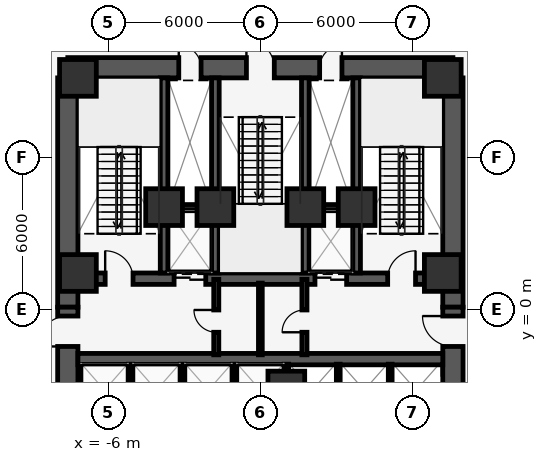
"""IFC4 building model, lengths in metres.
Left out: names, types, materials, properties, quantities, classifications, styles, units other than length and angle.
Written with IfcOpenShell. Run it as: python <this file> out.ifc"""

import sys

from ifc_helpers import new_model, si_unit, direction, frame, frame_2d, origin, origin_2d, place, context, subcontext, project, spatial, rectangle, extrude, element, fill, save


model = new_model("IFC4")
c1 = context("Model", 3, precision=1e-05, world=origin(), true_north=direction((0.0, 1.0)))
c2 = subcontext(c1, "Body", "Model", "MODEL_VIEW")
j1 = project(units=[si_unit("LENGTHUNIT", "METRE"), si_unit("PLANEANGLEUNIT", "RADIAN")], contexts=[c1])
p1 = place(None, origin())
s1 = spatial("IfcSite", under=j1, at=p1, CompositionType="ELEMENT")
p2 = place(p1, origin())
s2 = spatial("IfcBuilding", under=s1, at=p2, CompositionType="ELEMENT")
p3 = place(p2, frame((0.0, 0.0, 62.4)))
s3 = spatial("IfcBuildingStorey", under=s2, at=p3, CompositionType="ELEMENT", Elevation=62.4)
p4 = place(p3, frame((-7.6, 9.55, 0.0), z_axis=(0.0, 0.0, 1.0), x_axis=(1.0, 0.0, 0.0)))
e1 = element("IfcWall", 1, at=p4, inside=s3, PredefinedType="SHEAR", context=c2, shape_type="SweptSolid", body=[
    extrude(rectangle(XDim=15.2, YDim=0.8, at=frame_2d((7.6, 0.0))), origin(), (0.0, 0.0, 1.0), 4.35),
])
p5 = place(p4, frame((7.05, 0.0, 0.0)))
e2 = element("IfcOpeningElement", 2, at=p5, cuts=e1, PredefinedType="OPENING", context=c2, shape_type="SweptSolid", body=[
    extrude(rectangle(XDim=1.1, YDim=2.15, at=frame_2d((0.55, 1.075))), frame((0.0, 0.41, 0.0), z_axis=(0.0, -1.0, 0.0), x_axis=(1.0, 0.0, 0.0)), (0.0, 0.0, 1.0), 0.82),
])
p6 = place(p4, frame((4.38, 0.0, 0.0)))
e3 = element("IfcOpeningElement", 3, at=p6, cuts=e1, PredefinedType="OPENING", context=c2, shape_type="SweptSolid", body=[
    extrude(rectangle(XDim=0.88, YDim=2.15, at=frame_2d((0.44, 1.075))), frame((0.0, 0.41, 0.0), z_axis=(0.0, -1.0, 0.0), x_axis=(1.0, 0.0, 0.0)), (0.0, 0.0, 1.0), 0.82),
])
p7 = place(p4, frame((9.94, 0.0, 0.0)))
e4 = element("IfcOpeningElement", 4, at=p7, cuts=e1, PredefinedType="OPENING", context=c2, shape_type="SweptSolid", body=[
    extrude(rectangle(XDim=0.88, YDim=2.15, at=frame_2d((0.44, 1.075))), frame((0.0, 0.41, 0.0), z_axis=(0.0, -1.0, 0.0), x_axis=(1.0, 0.0, 0.0)), (0.0, 0.0, 1.0), 0.82),
])
p8 = place(p3, frame((-7.2, 1.225, 0.0), z_axis=(0.0, 0.0, 1.0), x_axis=(1.0, 0.0, 0.0)))
e5 = element("IfcWall", 5, at=p8, inside=s3, PredefinedType="SHEAR", context=c2, shape_type="SweptSolid", body=[
    extrude(rectangle(XDim=14.4, YDim=0.45, at=frame_2d((7.2, 0.0))), origin(), (0.0, 0.0, 1.0), 4.35),
])
p9 = place(p8, frame((3.795, 0.0, 0.0)))
e6 = element("IfcOpeningElement", 6, at=p9, cuts=e5, PredefinedType="OPENING", context=c2, shape_type="SweptSolid", body=[
    extrude(rectangle(XDim=1.25, YDim=2.25, at=frame_2d((0.625, 1.125))), frame((0.0, 0.235, 0.0), z_axis=(0.0, -1.0, 0.0), x_axis=(1.0, 0.0, 0.0)), (0.0, 0.0, 1.0), 0.47),
])
p10 = place(p8, frame((9.355, 0.0, 0.0)))
e7 = element("IfcOpeningElement", 7, at=p10, cuts=e5, PredefinedType="OPENING", context=c2, shape_type="SweptSolid", body=[
    extrude(rectangle(XDim=1.25, YDim=2.25, at=frame_2d((0.625, 1.125))), frame((0.0, 0.235, 0.0), z_axis=(0.0, -1.0, 0.0), x_axis=(1.0, 0.0, 0.0)), (0.0, 0.0, 1.0), 0.47),
])
p11 = place(p8, frame((1.075, 0.0, 0.0)))
e8 = element("IfcOpeningElement", 8, at=p11, cuts=e5, PredefinedType="OPENING", context=c2, shape_type="SweptSolid", body=[
    extrude(rectangle(XDim=1.1, YDim=2.15, at=frame_2d((0.55, 1.075))), frame((0.0, 0.235, 0.0), z_axis=(0.0, -1.0, 0.0), x_axis=(1.0, 0.0, 0.0)), (0.0, 0.0, 1.0), 0.47),
])
p12 = place(p8, frame((12.225, 0.0, 0.0)))
e9 = element("IfcOpeningElement", 9, at=p12, cuts=e5, PredefinedType="OPENING", context=c2, shape_type="SweptSolid", body=[
    extrude(rectangle(XDim=1.1, YDim=2.15, at=frame_2d((0.55, 1.075))), frame((0.0, 0.235, 0.0), z_axis=(0.0, -1.0, 0.0), x_axis=(1.0, 0.0, 0.0)), (0.0, 0.0, 1.0), 0.47),
])
for number, where, z_axis, x_axis in (
    (10, (-3.8, 1.45, 0.0), (0.0, 0.0, 1.0), (0.0, 1.0, 0.0)),
    (11, (-1.775, 1.45, 0.0), (0.0, 0.0, 1.0), (0.0, 1.0, 0.0)),
    (12, (1.775, 1.45, 0.0), (0.0, 0.0, 1.0), (0.0, 1.0, 0.0)),
    (13, (3.8, 1.45, 0.0), (0.0, 0.0, 1.0), (0.0, 1.0, 0.0)),
):
    element("IfcWall", number, at=place(p3, frame(where, z_axis=z_axis, x_axis=x_axis)), inside=s3, PredefinedType="SHEAR", context=c2, shape_type="SweptSolid", body=[
        extrude(rectangle(XDim=7.7, YDim=0.3, at=frame_2d((3.85, 0.0))), origin(), (0.0, 0.0, 1.0), 4.35),
    ])
for number, where, z_axis, x_axis in (
    (14, (-7.6, 0.1, 0.0), (0.0, 0.0, 1.0), (0.0, 1.0, 0.0)),
    (15, (7.6, 0.1, 0.0), (0.0, 0.0, 1.0), (0.0, 1.0, 0.0)),
):
    element("IfcWall", number, at=place(p3, frame(where, z_axis=z_axis, x_axis=x_axis)), inside=s3, PredefinedType="SHEAR", context=c2, shape_type="SweptSolid", body=[
        extrude(rectangle(XDim=9.05, YDim=0.8, at=frame_2d((4.525, 0.0))), origin(), (0.0, 0.0, 1.0), 4.35),
    ])
p13 = place(p3, frame((-7.6, -8.85, 0.0), z_axis=(0.0, 0.0, 1.0), x_axis=(0.0, 1.0, 0.0)))
e16 = element("IfcWall", 16, at=p13, inside=s3, PredefinedType="SHEAR", context=c2, shape_type="SweptSolid", body=[
    extrude(rectangle(XDim=8.95, YDim=0.8, at=frame_2d((4.475, 0.0))), origin(), (0.0, 0.0, 1.0), 4.35),
])
p14 = place(p13, frame((2.49, 0.0, 0.0)))
e17 = element("IfcOpeningElement", 17, at=p14, cuts=e16, PredefinedType="OPENING", context=c2, shape_type="SweptSolid", body=[
    extrude(rectangle(XDim=1.8, YDim=2.2, at=frame_2d((0.9, 1.1))), frame((0.0, 0.41, 0.0), z_axis=(0.0, -1.0, 0.0), x_axis=(1.0, 0.0, 0.0)), (0.0, 0.0, 1.0), 0.82),
])
p15 = place(p13, frame((7.4, 0.0, 0.0)))
e18 = element("IfcOpeningElement", 18, at=p15, cuts=e16, PredefinedType="OPENING", context=c2, shape_type="SweptSolid", body=[
    extrude(rectangle(XDim=1.2, YDim=2.15, at=frame_2d((0.6, 1.075))), frame((0.0, 0.41, 0.0), z_axis=(0.0, -1.0, 0.0), x_axis=(1.0, 0.0, 0.0)), (0.0, 0.0, 1.0), 0.82),
])
p16 = place(p3, frame((7.6, -8.85, 0.0), z_axis=(0.0, 0.0, 1.0), x_axis=(0.0, 1.0, 0.0)))
e19 = element("IfcWall", 19, at=p16, inside=s3, PredefinedType="SHEAR", context=c2, shape_type="SweptSolid", body=[
    extrude(rectangle(XDim=8.95, YDim=0.8, at=frame_2d((4.475, 0.0))), origin(), (0.0, 0.0, 1.0), 4.35),
])
p17 = place(p16, frame((2.49, 0.0, 0.0)))
e20 = element("IfcOpeningElement", 20, at=p17, cuts=e19, PredefinedType="OPENING", context=c2, shape_type="SweptSolid", body=[
    extrude(rectangle(XDim=1.8, YDim=2.2, at=frame_2d((0.9, 1.1))), frame((0.0, 0.41, 0.0), z_axis=(0.0, -1.0, 0.0), x_axis=(1.0, 0.0, 0.0)), (0.0, 0.0, 1.0), 0.82),
])
p18 = place(p16, frame((7.4, 0.0, 0.0)))
e21 = element("IfcOpeningElement", 21, at=p18, cuts=e19, PredefinedType="OPENING", context=c2, shape_type="SweptSolid", body=[
    extrude(rectangle(XDim=1.2, YDim=2.15, at=frame_2d((0.6, 1.075))), frame((0.0, 0.41, 0.0), z_axis=(0.0, -1.0, 0.0), x_axis=(1.0, 0.0, 0.0)), (0.0, 0.0, 1.0), 0.82),
])
p19 = place(p3, frame((-7.2, -1.95, 0.0), z_axis=(0.0, 0.0, 1.0), x_axis=(1.0, 0.0, 0.0)))
e22 = element("IfcWall", 22, at=p19, inside=s3, PredefinedType="SHEAR", context=c2, shape_type="SweptSolid", body=[
    extrude(rectangle(XDim=14.4, YDim=0.45, at=frame_2d((7.2, 0.0))), origin(), (0.0, 0.0, 1.0), 4.35),
])
for number, where, z_axis, x_axis in (
    (23, (7.2, 1.45, 0.0), (0.0, 0.0, 1.0), (1.0, 0.0, 0.0)),
    (24, (7.2, 9.15, 0.0), (0.0, 0.0, 1.0), (1.0, 0.0, 0.0)),
    (25, (-7.2, 9.15, 0.0), (0.0, 0.0, 1.0), (1.0, 0.0, 0.0)),
    (26, (-7.2, 1.45, 0.0), (0.0, 0.0, 1.0), (1.0, 0.0, 0.0)),
    (27, (-3.8, 4.05, 0.0), (0.0, 0.0, 1.0), (1.0, 0.0, 0.0)),
    (28, (3.8, 4.05, 0.0), (0.0, 0.0, 1.0), (1.0, 0.0, 0.0)),
    (29, (-1.775, 4.05, 0.0), (0.0, 0.0, 1.0), (1.0, 0.0, 0.0)),
    (30, (1.775, 4.05, 0.0), (0.0, 0.0, 1.0), (1.0, 0.0, 0.0)),
    (31, (1.025, -3.15, 0.0), (0.0, 0.0, 1.0), (1.0, 0.0, 0.0)),
):
    element("IfcColumn", number, at=place(p3, frame(where, z_axis=z_axis, x_axis=x_axis)), inside=s3, PredefinedType="COLUMN", context=c2, shape_type="SweptSolid", body=[
        extrude(rectangle(XDim=1.45, YDim=1.45, at=origin_2d()), origin(), (0.0, 0.0, 1.0), 4.6),
    ])
p20 = place(p3, frame((-0.115, 39.555, 0.0), z_axis=(0.0, 0.0, 1.0), x_axis=(0.605877389385, -0.795558036243, 0.0)))
e32 = element("IfcWall", 32, at=p20, inside=s3, PredefinedType="STANDARD", context=c2, shape_type="SweptSolid", body=[
    extrude(rectangle(XDim=64.058, YDim=0.32, at=frame_2d((32.029, 0.0))), origin(), (0.0, 0.0, 1.0), 4.35),
])
p21 = place(p20, frame((6.179, 0.0, 0.85)))
e33 = element("IfcOpeningElement", 33, at=p21, cuts=e32, PredefinedType="OPENING", context=c2, shape_type="SweptSolid", body=[
    extrude(rectangle(XDim=1.3, YDim=2.1, at=frame_2d((0.65, 1.05))), frame((0.0, 0.17, 0.0), z_axis=(0.0, -1.0, 0.0), x_axis=(1.0, 0.0, 0.0)), (0.0, 0.0, 1.0), 0.34),
])
p22 = place(p20, frame((11.779, 0.0, 0.85)))
e34 = element("IfcOpeningElement", 34, at=p22, cuts=e32, PredefinedType="OPENING", context=c2, shape_type="SweptSolid", body=[
    extrude(rectangle(XDim=1.3, YDim=2.1, at=frame_2d((0.65, 1.05))), frame((0.0, 0.17, 0.0), z_axis=(0.0, -1.0, 0.0), x_axis=(1.0, 0.0, 0.0)), (0.0, 0.0, 1.0), 0.34),
])
p23 = place(p20, frame((17.379, 0.0, 0.85)))
e35 = element("IfcOpeningElement", 35, at=p23, cuts=e32, PredefinedType="OPENING", context=c2, shape_type="SweptSolid", body=[
    extrude(rectangle(XDim=1.3, YDim=2.1, at=frame_2d((0.65, 1.05))), frame((0.0, 0.17, 0.0), z_axis=(0.0, -1.0, 0.0), x_axis=(1.0, 0.0, 0.0)), (0.0, 0.0, 1.0), 0.34),
])
p24 = place(p20, frame((50.979, 0.0, 0.85)))
e36 = element("IfcOpeningElement", 36, at=p24, cuts=e32, PredefinedType="OPENING", context=c2, shape_type="SweptSolid", body=[
    extrude(rectangle(XDim=1.3, YDim=2.1, at=frame_2d((0.65, 1.05))), frame((0.0, 0.17, 0.0), z_axis=(0.0, -1.0, 0.0), x_axis=(1.0, 0.0, 0.0)), (0.0, 0.0, 1.0), 0.34),
])
p25 = place(p20, frame((56.579, 0.0, 0.85)))
e37 = element("IfcOpeningElement", 37, at=p25, cuts=e32, PredefinedType="OPENING", context=c2, shape_type="SweptSolid", body=[
    extrude(rectangle(XDim=1.3, YDim=2.1, at=frame_2d((0.65, 1.05))), frame((0.0, 0.17, 0.0), z_axis=(0.0, -1.0, 0.0), x_axis=(1.0, 0.0, 0.0)), (0.0, 0.0, 1.0), 0.34),
])
for number, where, z_axis, x_axis in (
    (38, (-3.65, 4.05, 0.0), (0.0, 0.0, 1.0), (1.0, 0.0, 0.0)),
    (39, (1.92, 4.05, 0.0), (0.0, 0.0, 1.0), (1.0, 0.0, 0.0)),
):
    element("IfcWall", number, at=place(p3, frame(where, z_axis=z_axis, x_axis=x_axis)), inside=s3, PredefinedType="PARTITIONING", context=c2, shape_type="SweptSolid", body=[
        extrude(rectangle(XDim=1.73, YDim=0.2, at=frame_2d((0.865, 0.0))), origin(), (0.0, 0.0, 1.0), 4.35),
    ])
for number, where, z_axis, x_axis in (
    (40, (-5.125, -4.18, 0.0), (0.0, 0.0, 1.0), (0.0, 1.0, 0.0)),
    (41, (-3.075, -4.18, 0.0), (0.0, 0.0, 1.0), (0.0, 1.0, 0.0)),
    (42, (-1.025, -4.18, 0.0), (0.0, 0.0, 1.0), (0.0, 1.0, 0.0)),
):
    element("IfcWall", number, at=place(p3, frame(where, z_axis=z_axis, x_axis=x_axis)), inside=s3, PredefinedType="PARTITIONING", context=c2, shape_type="SweptSolid", body=[
        extrude(rectangle(XDim=2.03, YDim=0.15, at=frame_2d((1.015, 0.0))), origin(), (0.0, 0.0, 1.0), 4.35),
    ])
p26 = place(p3, frame((1.025, -4.18, 0.0), z_axis=(0.0, 0.0, 1.0), x_axis=(0.0, 1.0, 0.0)))
e43 = element("IfcWall", 43, at=p26, inside=s3, PredefinedType="PARTITIONING", context=c2, shape_type="SweptSolid", body=[
    extrude(rectangle(XDim=2.03, YDim=0.18, at=frame_2d((1.015, 0.0))), origin(), (0.0, 0.0, 1.0), 3.398),
])
for number, where, z_axis, x_axis in (
    (44, (3.075, -4.18, 0.0), (0.0, 0.0, 1.0), (0.0, 1.0, 0.0)),
    (45, (5.125, -4.18, 0.0), (0.0, 0.0, 1.0), (0.0, 1.0, 0.0)),
):
    element("IfcWall", number, at=place(p3, frame(where, z_axis=z_axis, x_axis=x_axis)), inside=s3, PredefinedType="PARTITIONING", context=c2, shape_type="SweptSolid", body=[
        extrude(rectangle(XDim=2.03, YDim=0.15, at=frame_2d((1.015, 0.0))), origin(), (0.0, 0.0, 1.0), 4.35),
    ])
p27 = place(p3, frame((-1.74, -1.78, 0.0), z_axis=(0.0, 0.0, 1.0), x_axis=(0.0, 1.0, 0.0)))
e46 = element("IfcWall", 46, at=p27, inside=s3, PredefinedType="PARTITIONING", context=c2, shape_type="SweptSolid", body=[
    extrude(rectangle(XDim=2.98, YDim=0.2, at=frame_2d((1.49, 0.0))), origin(), (0.0, 0.0, 1.0), 4.35),
])
p28 = place(p27, frame((0.89, 0.0, 0.0)))
e47 = element("IfcOpeningElement", 47, at=p28, cuts=e46, PredefinedType="OPENING", context=c2, shape_type="SweptSolid", body=[
    extrude(rectangle(XDim=0.88, YDim=2.15, at=frame_2d((0.44, 1.075))), frame((0.0, 0.11, 0.0), z_axis=(0.0, -1.0, 0.0), x_axis=(1.0, 0.0, 0.0)), (0.0, 0.0, 1.0), 0.22),
])
p29 = place(p3, frame((1.74, -1.78, 0.0), z_axis=(0.0, 0.0, 1.0), x_axis=(0.0, 1.0, 0.0)))
e48 = element("IfcWall", 48, at=p29, inside=s3, PredefinedType="PARTITIONING", context=c2, shape_type="SweptSolid", body=[
    extrude(rectangle(XDim=2.98, YDim=0.2, at=frame_2d((1.49, 0.0))), origin(), (0.0, 0.0, 1.0), 4.35),
])
p30 = place(p29, frame((0.89, 0.0, 0.0)))
e49 = element("IfcOpeningElement", 49, at=p30, cuts=e48, PredefinedType="OPENING", context=c2, shape_type="SweptSolid", body=[
    extrude(rectangle(XDim=0.88, YDim=2.15, at=frame_2d((0.44, 1.075))), frame((0.0, 0.11, 0.0), z_axis=(0.0, -1.0, 0.0), x_axis=(1.0, 0.0, 0.0)), (0.0, 0.0, 1.0), 0.22),
])
p31 = place(p3, frame((0.0, -1.78, 0.0), z_axis=(0.0, 0.0, 1.0), x_axis=(0.0, 1.0, 0.0)))
e50 = element("IfcWall", 50, at=p31, inside=s3, PredefinedType="PARTITIONING", context=c2, shape_type="SweptSolid", body=[
    extrude(rectangle(XDim=2.83, YDim=0.15, at=frame_2d((1.415, 0.0))), origin(), (0.0, 0.0, 1.0), 4.35),
])
p32 = place(p9, origin())
e51 = element("IfcDoor", 51, at=p32, inside=s3, OperationType="DOUBLE_DOOR_SLIDING", PredefinedType="DOOR", context=c2, shape_type="SweptSolid", body=[
    extrude(rectangle(XDim=1.25, YDim=2.25, at=frame_2d((0.625, 1.125))), frame((0.0, 0.025, 0.0), z_axis=(0.0, -1.0, 0.0), x_axis=(1.0, 0.0, 0.0)), (0.0, 0.0, 1.0), 0.05),
])
fill(e6, e51)
p33 = place(p10, origin())
e52 = element("IfcDoor", 52, at=p33, inside=s3, OperationType="DOUBLE_DOOR_SLIDING", PredefinedType="DOOR", context=c2, shape_type="SweptSolid", body=[
    extrude(rectangle(XDim=1.25, YDim=2.25, at=frame_2d((0.625, 1.125))), frame((0.0, 0.025, 0.0), z_axis=(0.0, -1.0, 0.0), x_axis=(1.0, 0.0, 0.0)), (0.0, 0.0, 1.0), 0.05),
])
fill(e7, e52)
p34 = place(p11, origin())
e53 = element("IfcDoor", 53, at=p34, inside=s3, OperationType="SINGLE_SWING_LEFT", PredefinedType="DOOR", context=c2, shape_type="SweptSolid", body=[
    extrude(rectangle(XDim=1.1, YDim=2.15, at=frame_2d((0.55, 1.075))), frame((0.0, 0.025, 0.0), z_axis=(0.0, -1.0, 0.0), x_axis=(1.0, 0.0, 0.0)), (0.0, 0.0, 1.0), 0.05),
])
fill(e8, e53)
p35 = place(p12, origin())
e54 = element("IfcDoor", 54, at=p35, inside=s3, OperationType="SINGLE_SWING_RIGHT", PredefinedType="DOOR", context=c2, shape_type="SweptSolid", body=[
    extrude(rectangle(XDim=1.1, YDim=2.15, at=frame_2d((0.55, 1.075))), frame((0.0, 0.025, 0.0), z_axis=(0.0, -1.0, 0.0), x_axis=(1.0, 0.0, 0.0)), (0.0, 0.0, 1.0), 0.05),
])
fill(e9, e54)
p36 = place(p5, origin())
e55 = element("IfcDoor", 55, at=p36, inside=s3, OperationType="SINGLE_SWING_LEFT", PredefinedType="DOOR", context=c2, shape_type="SweptSolid", body=[
    extrude(rectangle(XDim=1.1, YDim=2.15, at=frame_2d((0.55, 1.075))), frame((0.0, 0.025, 0.0), z_axis=(0.0, -1.0, 0.0), x_axis=(1.0, 0.0, 0.0)), (0.0, 0.0, 1.0), 0.05),
])
fill(e2, e55)
p37 = place(p6, origin())
e56 = element("IfcDoor", 56, at=p37, inside=s3, OperationType="SINGLE_SWING_LEFT", PredefinedType="DOOR", context=c2, shape_type="SweptSolid", body=[
    extrude(rectangle(XDim=0.88, YDim=2.15, at=frame_2d((0.44, 1.075))), frame((0.0, 0.025, 0.0), z_axis=(0.0, -1.0, 0.0), x_axis=(1.0, 0.0, 0.0)), (0.0, 0.0, 1.0), 0.05),
])
fill(e3, e56)
p38 = place(p7, origin())
e57 = element("IfcDoor", 57, at=p38, inside=s3, OperationType="SINGLE_SWING_RIGHT", PredefinedType="DOOR", context=c2, shape_type="SweptSolid", body=[
    extrude(rectangle(XDim=0.88, YDim=2.15, at=frame_2d((0.44, 1.075))), frame((0.0, 0.025, 0.0), z_axis=(0.0, -1.0, 0.0), x_axis=(1.0, 0.0, 0.0)), (0.0, 0.0, 1.0), 0.05),
])
fill(e4, e57)
p39 = place(p15, origin())
e58 = element("IfcDoor", 58, at=p39, inside=s3, OperationType="SINGLE_SWING_LEFT", PredefinedType="DOOR", context=c2, shape_type="SweptSolid", body=[
    extrude(rectangle(XDim=1.2, YDim=2.15, at=frame_2d((0.6, 1.075))), frame((0.0, 0.025, 0.0), z_axis=(0.0, -1.0, 0.0), x_axis=(1.0, 0.0, 0.0)), (0.0, 0.0, 1.0), 0.05),
])
fill(e18, e58)
p40 = place(p18, origin())
e59 = element("IfcDoor", 59, at=p40, inside=s3, OperationType="SINGLE_SWING_RIGHT", PredefinedType="DOOR", context=c2, shape_type="SweptSolid", body=[
    extrude(rectangle(XDim=1.2, YDim=2.15, at=frame_2d((0.6, 1.075))), frame((0.0, 0.025, 0.0), z_axis=(0.0, -1.0, 0.0), x_axis=(1.0, 0.0, 0.0)), (0.0, 0.0, 1.0), 0.05),
])
fill(e21, e59)
p41 = place(p28, origin())
e60 = element("IfcDoor", 60, at=p41, inside=s3, OperationType="SINGLE_SWING_RIGHT", PredefinedType="DOOR", context=c2, shape_type="SweptSolid", body=[
    extrude(rectangle(XDim=0.88, YDim=2.15, at=frame_2d((0.44, 1.075))), frame((0.0, 0.025, 0.0), z_axis=(0.0, -1.0, 0.0), x_axis=(1.0, 0.0, 0.0)), (0.0, 0.0, 1.0), 0.05),
])
fill(e47, e60)
p42 = place(p30, origin())
e61 = element("IfcDoor", 61, at=p42, inside=s3, OperationType="SINGLE_SWING_LEFT", PredefinedType="DOOR", context=c2, shape_type="SweptSolid", body=[
    extrude(rectangle(XDim=0.88, YDim=2.15, at=frame_2d((0.44, 1.075))), frame((0.0, 0.025, 0.0), z_axis=(0.0, -1.0, 0.0), x_axis=(1.0, 0.0, 0.0)), (0.0, 0.0, 1.0), 0.05),
])
fill(e49, e61)
save(model, sys.argv[1])
